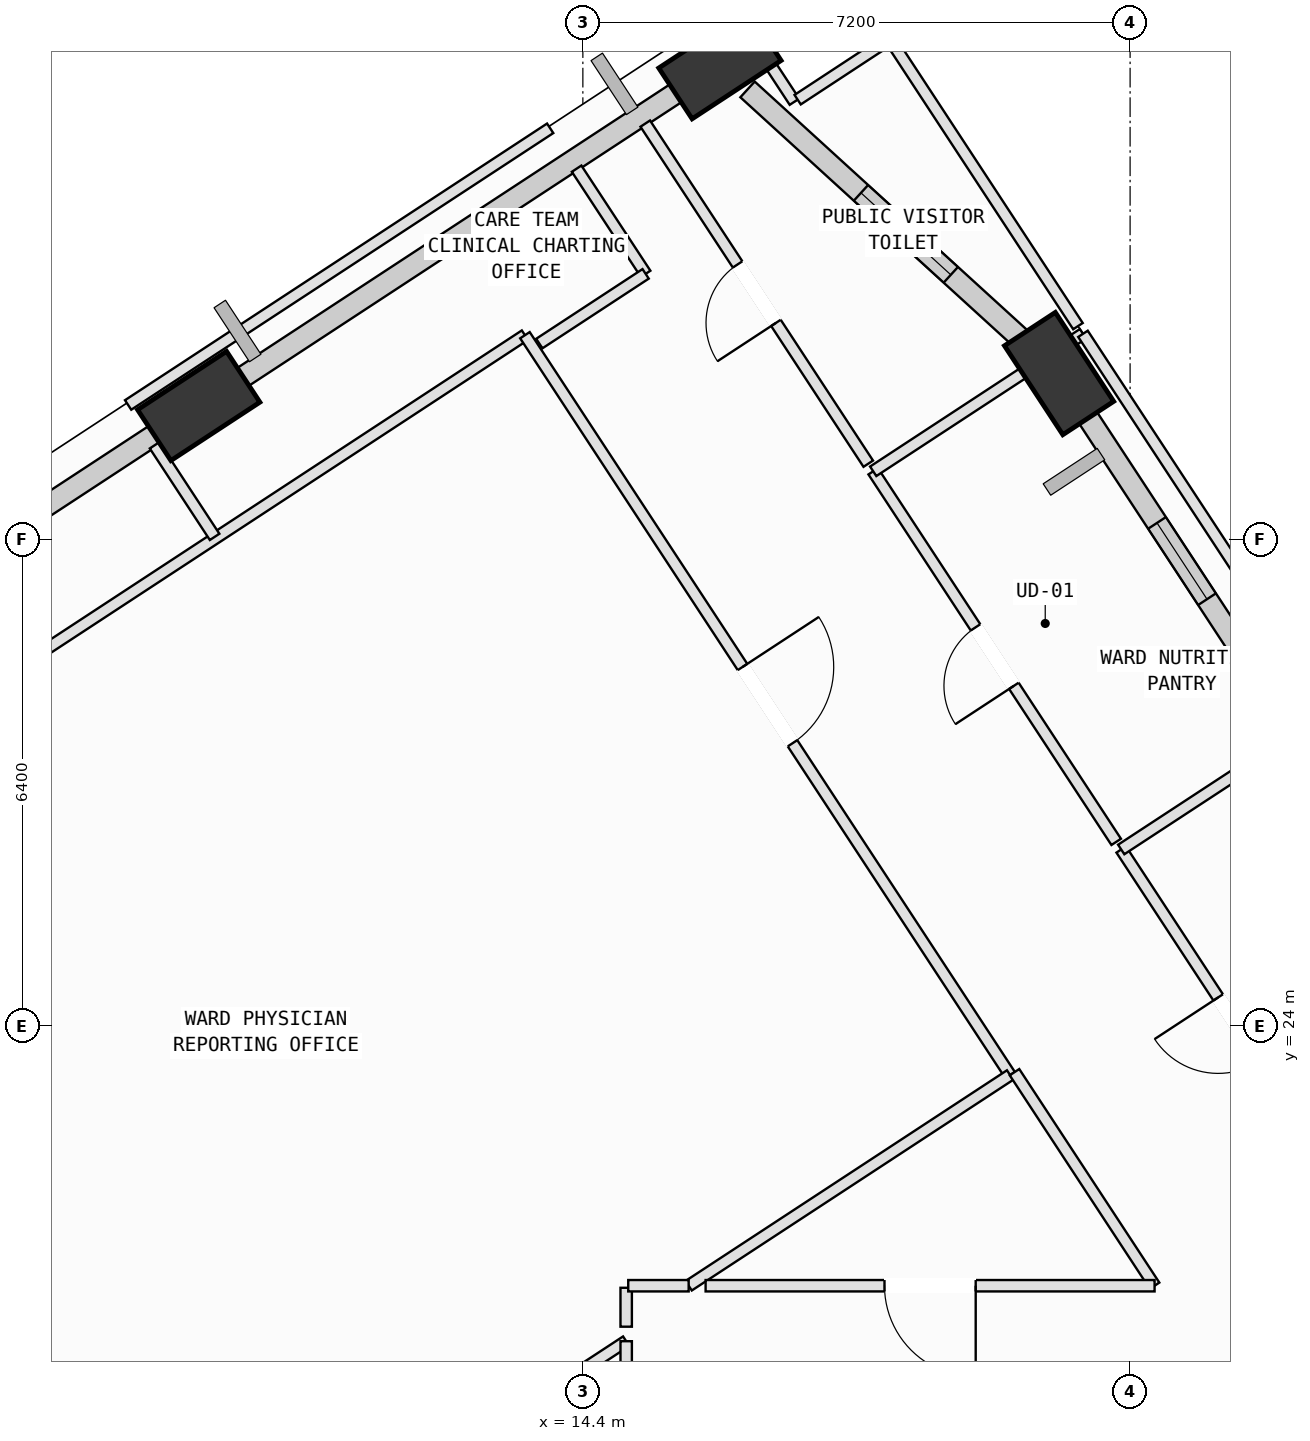
"""IFC4 building model, lengths in metres.
Left out: names, types, materials, properties, quantities, classifications, styles, units other than length and angle.
Written with IfcOpenShell. Run it as: python <this file> out.ifc"""

import sys

from ifc_helpers import new_model, si_unit, direction, frame, frame_2d, origin, origin_2d, place, context, subcontext, project, spatial, rectangle, extrude, element, fill, save


model = new_model("IFC4")
c1 = context("Model", 3, precision=1e-05, world=origin(), true_north=direction((0.0, 1.0)))
c2 = subcontext(c1, "Body", "Model", "MODEL_VIEW")
j1 = project(units=[si_unit("LENGTHUNIT", "METRE"), si_unit("PLANEANGLEUNIT", "RADIAN")], contexts=[c1])
p1 = place(None, origin())
s1 = spatial("IfcSite", under=j1, at=p1, CompositionType="ELEMENT")
p2 = place(p1, origin())
s2 = spatial("IfcBuilding", under=s1, at=p2, CompositionType="ELEMENT")
p3 = place(p2, frame((0.0, 0.0, 165.8)))
s3 = spatial("IfcBuildingStorey", under=s2, at=p3, CompositionType="ELEMENT", Elevation=165.8)
p4 = place(p3, frame((20.666, 32.582, 0.002), z_axis=(-0.031766312901, -0.053777136236, 0.99804755447), x_axis=(-0.047579985119, 0.997500791827, 0.052233277912)))
e1 = element("IfcColumn", 1, at=p4, inside=s3, PredefinedType="COLUMN", context=c2, shape_type="SweptSolid", body=[
    extrude(rectangle(XDim=1.4, YDim=0.8, at=origin_2d()), origin(), (0.0, 0.0, 1.0), 4.004),
])
p5 = place(p3, frame((16.204, 36.652, 0.002), z_axis=(-0.048383489363, -0.072240505501, 0.996213002988), x_axis=(0.998796364309, -0.011541167094, 0.047672047424)))
e2 = element("IfcColumn", 2, at=p5, inside=s3, PredefinedType="COLUMN", context=c2, shape_type="SweptSolid", body=[
    extrude(rectangle(XDim=1.4, YDim=0.8, at=origin_2d()), origin(), (0.0, 0.0, 1.0), 4.011),
])
p6 = place(p3, frame((9.346, 32.156, 0.002), z_axis=(-0.029466986513, -0.100248510816, 0.994525983967), x_axis=(0.956119960722, 0.28731928524, 0.057290915853)))
e3 = element("IfcColumn", 3, at=p6, inside=s3, PredefinedType="COLUMN", context=c2, shape_type="SweptSolid", body=[
    extrude(rectangle(XDim=1.4, YDim=0.8, at=origin_2d()), origin(), (0.0, 0.0, 1.0), 4.018),
])
p7 = place(p3, frame((24.373, 26.928, 0.0), z_axis=(0.0, 0.0, 1.0), x_axis=(-0.548310186412, 0.836275038176, 0.0)))
e4 = element("IfcWall", 4, at=p7, inside=s3, PredefinedType="SOLIDWALL", context=c2, shape_type="SweptSolid", body=[
    extrude(rectangle(XDim=6.223, YDim=0.28, at=frame_2d((3.111, 0.0))), origin(), (0.0, 0.0, 1.0), 3.165),
])
p8 = place(p7, frame((3.211, 0.0, 0.75)))
e5 = element("IfcOpeningElement", 5, at=p8, cuts=e4, PredefinedType="OPENING", context=c2, shape_type="SweptSolid", body=[
    extrude(rectangle(XDim=1.2, YDim=1.75, at=frame_2d((0.6, 0.875))), frame((0.0, 0.15, 0.0), z_axis=(0.0, -1.0, 0.0), x_axis=(1.0, 0.0, 0.0)), (0.0, 0.0, 1.0), 0.3),
])
p9 = place(p3, frame((16.567, 36.321, 0.0), z_axis=(0.0, 0.0, 1.0), x_axis=(0.738817531131, -0.673905524308, 0.0)))
e6 = element("IfcWall", 6, at=p9, inside=s3, PredefinedType="SOLIDWALL", context=c2, shape_type="SweptSolid", body=[
    extrude(rectangle(XDim=5.093, YDim=0.28, at=frame_2d((2.546, 0.0))), origin(), (0.0, 0.0, 1.0), 3.165),
])
p10 = place(p9, frame((2.02, 0.0, 0.75)))
e7 = element("IfcOpeningElement", 7, at=p10, cuts=e6, PredefinedType="OPENING", context=c2, shape_type="SweptSolid", body=[
    extrude(rectangle(XDim=1.6, YDim=1.95, at=frame_2d((0.8, 0.975))), frame((0.0, 0.15, 0.0), z_axis=(0.0, -1.0, 0.0), x_axis=(1.0, 0.0, 0.0)), (0.0, 0.0, 1.0), 0.3),
])
p11 = place(p3, frame((9.611, 32.33, 0.0), z_axis=(0.0, 0.0, 1.0), x_axis=(0.836290304758, 0.548286901327, 0.0)))
e8 = element("IfcWall", 8, at=p11, inside=s3, PredefinedType="SOLIDWALL", context=c2, shape_type="SweptSolid", body=[
    extrude(rectangle(XDim=7.231, YDim=0.28, at=frame_2d((3.615, 0.0))), origin(), (0.0, 0.0, 1.0), 3.165),
])
p12 = place(p3, frame((2.733, 27.821, 0.0), z_axis=(0.0, 0.0, 1.0), x_axis=(0.836277942269, 0.548305757105, 0.0)))
e9 = element("IfcWall", 9, at=p12, inside=s3, PredefinedType="SOLIDWALL", context=c2, shape_type="SweptSolid", body=[
    extrude(rectangle(XDim=7.27, YDim=0.28, at=frame_2d((3.635, 0.0))), origin(), (0.0, 0.0, 1.0), 3.165),
])
p13 = place(p3, frame((7.409, 14.893, 0.0), z_axis=(0.0, 0.0, 1.0), x_axis=(0.836296330396, 0.548277710441, 0.0)))
e10 = element("IfcWall", 10, at=p13, inside=s3, PredefinedType="PARTITIONING", context=c2, shape_type="SweptSolid", body=[
    extrude(rectangle(XDim=9.041, YDim=0.15, at=frame_2d((4.521, 0.0))), origin(), (0.0, 0.0, 1.0), 3.78),
])
p14 = place(p13, frame((4.091, 0.0, 0.0)))
e11 = element("IfcOpeningElement", 11, at=p14, cuts=e10, PredefinedType="OPENING", context=c2, shape_type="SweptSolid", body=[
    extrude(rectangle(XDim=0.86, YDim=2.06, at=frame_2d((0.43, 1.03))), frame((0.0, 0.085, 0.0), z_axis=(0.0, -1.0, 0.0), x_axis=(1.0, 0.0, 0.0)), (0.0, 0.0, 1.0), 0.17),
])
p15 = place(p3, frame((14.97, 19.85, 0.0), z_axis=(0.0, 0.0, 1.0), x_axis=(0.0, -1.0, 0.0)))
e12 = element("IfcWall", 12, at=p15, inside=s3, PredefinedType="PARTITIONING", context=c2, shape_type="SweptSolid", body=[
    extrude(rectangle(XDim=1.62, YDim=0.15, at=frame_2d((0.81, 0.0))), origin(), (0.0, 0.0, 1.0), 3.78),
])
p16 = place(p3, frame((14.97, 20.553, 0.0), z_axis=(0.0, 0.0, 1.0), x_axis=(0.0, -1.0, 0.0)))
e13 = element("IfcWall", 13, at=p16, inside=s3, PredefinedType="PARTITIONING", context=c2, shape_type="SweptSolid", body=[
    extrude(rectangle(XDim=0.512, YDim=0.15, at=frame_2d((0.256, 0.0))), origin(), (0.0, 0.0, 1.0), 3.78),
])
p17 = place(p3, frame((2.54, 25.81, 0.0), z_axis=(0.0, 0.0, 1.0), x_axis=(0.836260132702, 0.548332919359, 0.0)))
e14 = element("IfcWall", 14, at=p17, inside=s3, PredefinedType="PARTITIONING", context=c2, shape_type="SweptSolid", body=[
    extrude(rectangle(XDim=13.271, YDim=0.15, at=frame_2d((6.635, 0.0))), origin(), (0.0, 0.0, 1.0), 3.78),
])
p18 = place(p3, frame((13.638, 33.087, 0.0), z_axis=(0.0, 0.0, 1.0), x_axis=(0.548329312424, -0.836262497746, 0.0)))
e15 = element("IfcWall", 15, at=p18, inside=s3, PredefinedType="PARTITIONING", context=c2, shape_type="SweptSolid", body=[
    extrude(rectangle(XDim=11.641, YDim=0.15, at=frame_2d((5.82, 0.0))), origin(), (0.0, 0.0, 1.0), 3.78),
])
p19 = place(p18, frame((5.22, 0.0, 0.0)))
e16 = element("IfcOpeningElement", 16, at=p19, cuts=e15, PredefinedType="OPENING", context=c2, shape_type="SweptSolid", body=[
    extrude(rectangle(XDim=1.2, YDim=2.15, at=frame_2d((0.6, 1.075))), frame((0.0, 0.085, 0.0), z_axis=(0.0, -1.0, 0.0), x_axis=(1.0, 0.0, 0.0)), (0.0, 0.0, 1.0), 0.17),
])
p20 = place(p3, frame((20.021, 23.352, 0.0), z_axis=(0.0, 0.0, 1.0), x_axis=(-0.836348158254, -0.548198648471, 0.0)))
e17 = element("IfcWall", 17, at=p20, inside=s3, PredefinedType="PARTITIONING", context=c2, shape_type="SweptSolid", body=[
    extrude(rectangle(XDim=5.056, YDim=0.15, at=frame_2d((2.528, 0.0))), origin(), (0.0, 0.0, 1.0), 3.78),
])
p21 = place(p3, frame((15.792, 20.58, 0.0), z_axis=(0.0, 0.0, 1.0), x_axis=(-1.0, 0.0, 0.0)))
e18 = element("IfcWall", 18, at=p21, inside=s3, PredefinedType="PARTITIONING", context=c2, shape_type="SweptSolid", body=[
    extrude(rectangle(XDim=0.795, YDim=0.15, at=frame_2d((0.397, 0.0))), origin(), (0.0, 0.0, 1.0), 3.78),
])
p22 = place(p3, frame((24.583, 21.591, 0.0), z_axis=(0.0, 0.0, 1.0), x_axis=(-0.548247074475, 0.8363164146, 0.0)))
e19 = element("IfcWall", 19, at=p22, inside=s3, PredefinedType="PARTITIONING", context=c2, shape_type="SweptSolid", body=[
    extrude(rectangle(XDim=5.655, YDim=0.15, at=frame_2d((2.827, 0.0))), origin(), (0.0, 0.0, 1.0), 3.415),
])
p23 = place(p22, frame((2.327, 0.0, 0.0)))
e20 = element("IfcOpeningElement", 20, at=p23, cuts=e19, PredefinedType="OPENING", context=c2, shape_type="SweptSolid", body=[
    extrude(rectangle(XDim=1.0, YDim=2.12, at=frame_2d((0.5, 1.06))), frame((0.0, 0.085, 0.0), z_axis=(0.0, -1.0, 0.0), x_axis=(1.0, 0.0, 0.0)), (0.0, 0.0, 1.0), 0.17),
])
p24 = place(p3, frame((21.483, 26.32, 0.0), z_axis=(0.0, 0.0, 1.0), x_axis=(0.836499207519, 0.547968133946, 0.0)))
e21 = element("IfcWall", 21, at=p24, inside=s3, PredefinedType="PARTITIONING", context=c2, shape_type="SweptSolid", body=[
    extrude(rectangle(XDim=2.635, YDim=0.15, at=frame_2d((1.317, 0.0))), origin(), (0.0, 0.0, 1.0), 3.78),
])
p25 = place(p3, frame((21.417, 26.42, 0.0), z_axis=(0.0, 0.0, 1.0), x_axis=(-0.548316159606, 0.836271121775, 0.0)))
e22 = element("IfcWall", 22, at=p25, inside=s3, PredefinedType="PARTITIONING", context=c2, shape_type="SweptSolid", body=[
    extrude(rectangle(XDim=5.831, YDim=0.15, at=frame_2d((2.915, 0.0))), origin(), (0.0, 0.0, 1.0), 3.78),
])
p26 = place(p25, frame((2.455, 0.0, 0.0)))
e23 = element("IfcOpeningElement", 23, at=p26, cuts=e22, PredefinedType="OPENING", context=c2, shape_type="SweptSolid", body=[
    extrude(rectangle(XDim=0.92, YDim=2.1, at=frame_2d((0.46, 1.05))), frame((0.0, 0.085, 0.0), z_axis=(0.0, -1.0, 0.0), x_axis=(1.0, 0.0, 0.0)), (0.0, 0.0, 1.0), 0.17),
])
p27 = place(p3, frame((18.22, 31.296, 0.0), z_axis=(0.0, 0.0, 1.0), x_axis=(0.836350018485, 0.548195810436, 0.0)))
e24 = element("IfcWall", 24, at=p27, inside=s3, PredefinedType="PARTITIONING", context=c2, shape_type="SweptSolid", body=[
    extrude(rectangle(XDim=3.3, YDim=0.15, at=frame_2d((1.65, 0.0))), origin(), (0.0, 0.0, 1.0), 3.78),
])
p28 = place(p3, frame((20.98, 33.105, 0.0), z_axis=(0.0, 0.0, 1.0), x_axis=(0.548392968486, -0.836220755611, 0.0)))
e25 = element("IfcWall", 25, at=p28, inside=s3, PredefinedType="PARTITIONING", context=c2, shape_type="SweptSolid", body=[
    extrude(rectangle(XDim=5.83, YDim=0.15, at=frame_2d((2.915, 0.0))), origin(), (0.0, 0.0, 1.0), 3.78),
])
p29 = place(p3, frame((18.439, 36.982, 0.0), z_axis=(0.0, 0.0, 1.0), x_axis=(0.548219331608, -0.836334600774, 0.0)))
e26 = element("IfcWall", 26, at=p29, inside=s3, PredefinedType="PARTITIONING", context=c2, shape_type="SweptSolid", body=[
    extrude(rectangle(XDim=4.515, YDim=0.15, at=frame_2d((2.257, 0.0))), origin(), (0.0, 0.0, 1.0), 3.78),
])
p30 = place(p3, frame((18.155, 31.396, 0.0), z_axis=(0.0, 0.0, 1.0), x_axis=(-0.548303612182, 0.836279348584, 0.0)))
e27 = element("IfcWall", 27, at=p30, inside=s3, PredefinedType="PARTITIONING", context=c2, shape_type="SweptSolid", body=[
    extrude(rectangle(XDim=5.351, YDim=0.15, at=frame_2d((2.676, 0.0))), origin(), (0.0, 0.0, 1.0), 3.78),
])
p31 = place(p30, frame((2.216, 0.0, 0.0)))
e28 = element("IfcOpeningElement", 28, at=p31, cuts=e27, PredefinedType="OPENING", context=c2, shape_type="SweptSolid", body=[
    extrude(rectangle(XDim=0.92, YDim=2.1, at=frame_2d((0.46, 1.05))), frame((0.0, 0.085, 0.0), z_axis=(0.0, -1.0, 0.0), x_axis=(1.0, 0.0, 0.0)), (0.0, 0.0, 1.0), 0.17),
])
p32 = place(p3, frame((15.554, 36.454, 0.0), z_axis=(0.0, 0.0, 1.0), x_axis=(0.836679505215, 0.547692802175, 0.0)))
e29 = element("IfcWall", 29, at=p32, inside=s3, PredefinedType="PARTITIONING", context=c2, shape_type="SweptSolid", body=[
    extrude(rectangle(XDim=1.201, YDim=0.15, at=frame_2d((0.601, 0.0))), origin(), (0.0, 0.0, 1.0), 3.165),
])
p33 = place(p3, frame((16.586, 37.07, 0.0), z_axis=(0.0, 0.0, 1.0), x_axis=(0.548793431799, -0.835957994887, 0.0)))
e30 = element("IfcWall", 30, at=p33, inside=s3, PredefinedType="PARTITIONING", context=c2, shape_type="SweptSolid", body=[
    extrude(rectangle(XDim=1.09, YDim=0.15, at=frame_2d((0.545, 0.0))), origin(), (0.0, 0.0, 1.0), 3.78),
])
p34 = place(p3, frame((17.226, 36.186, 0.0), z_axis=(0.0, 0.0, 1.0), x_axis=(0.83583800214, 0.548976169045, 0.0)))
e31 = element("IfcWall", 31, at=p34, inside=s3, PredefinedType="PARTITIONING", context=c2, shape_type="SweptSolid", body=[
    extrude(rectangle(XDim=1.401, YDim=0.15, at=frame_2d((0.7, 0.0))), origin(), (0.0, 0.0, 1.0), 3.78),
])
p35 = place(p3, frame((20.079, 23.39, 0.0), z_axis=(0.0, 0.0, 1.0), x_axis=(0.54846440247, -0.836173904892, 0.0)))
e32 = element("IfcWall", 32, at=p35, inside=s3, PredefinedType="PARTITIONING", context=c2, shape_type="SweptSolid", body=[
    extrude(rectangle(XDim=3.36, YDim=0.15, at=frame_2d((1.68, 0.0))), origin(), (0.0, 0.0, 1.0), 3.78),
])
p36 = place(p3, frame((21.922, 20.58, 0.0), z_axis=(0.0, 0.0, 1.0), x_axis=(-1.0, 0.0, 0.0)))
e33 = element("IfcWall", 33, at=p36, inside=s3, PredefinedType="PARTITIONING", context=c2, shape_type="SweptSolid", body=[
    extrude(rectangle(XDim=5.907, YDim=0.15, at=frame_2d((2.954, 0.0))), origin(), (0.0, 0.0, 1.0), 3.78),
])
p37 = place(p36, frame((2.354, 0.0, 0.0)))
e34 = element("IfcOpeningElement", 34, at=p37, cuts=e33, PredefinedType="OPENING", context=c2, shape_type="SweptSolid", body=[
    extrude(rectangle(XDim=1.2, YDim=2.15, at=frame_2d((0.6, 1.075))), frame((0.0, 0.085, 0.0), z_axis=(0.0, -1.0, 0.0), x_axis=(1.0, 0.0, 0.0)), (0.0, 0.0, 1.0), 0.17),
])
p38 = place(p3, frame((9.555, 30.433, 0.0), z_axis=(0.0, 0.0, 1.0), x_axis=(-0.548349191763, 0.836249462716, 0.0)))
e35 = element("IfcWall", 35, at=p38, inside=s3, PredefinedType="PARTITIONING", context=c2, shape_type="SweptSolid", body=[
    extrude(rectangle(XDim=1.441, YDim=0.15, at=frame_2d((0.72, 0.0))), origin(), (0.0, 0.0, 1.0), 3.78),
])
p39 = place(p3, frame((8.417, 32.169, 0.0), z_axis=(0.0, 0.0, 1.0), x_axis=(0.836324517696, 0.548234713513, 0.0)))
e36 = element("IfcWall", 36, at=p39, inside=s3, PredefinedType="PARTITIONING", context=c2, shape_type="SweptSolid", body=[
    extrude(rectangle(XDim=6.64, YDim=0.15, at=frame_2d((3.32, 0.0))), origin(), (0.0, 0.0, 1.0), 3.78),
])
p40 = place(p3, frame((14.318, 35.278, 0.0), z_axis=(0.0, 0.0, 1.0), x_axis=(0.548524345856, -0.836134583667, 0.0)))
e37 = element("IfcWall", 37, at=p40, inside=s3, PredefinedType="PARTITIONING", context=c2, shape_type="SweptSolid", body=[
    extrude(rectangle(XDim=1.655, YDim=0.15, at=frame_2d((0.828, 0.0))), origin(), (0.0, 0.0, 1.0), 3.78),
])
p41 = place(p3, frame((15.226, 33.894, 0.0), z_axis=(0.0, 0.0, 1.0), x_axis=(-0.836380380156, -0.548149486628, 0.0)))
e38 = element("IfcWall", 38, at=p41, inside=s3, PredefinedType="PARTITIONING", context=c2, shape_type="SweptSolid", body=[
    extrude(rectangle(XDim=1.673, YDim=0.15, at=frame_2d((0.836, 0.0))), origin(), (0.0, 0.0, 1.0), 3.78),
])
p42 = place(p8, origin())
e39 = element("IfcWindow", 39, at=p42, inside=s3, PartitioningType="SINGLE_PANEL", PredefinedType="WINDOW", context=c2, shape_type="SweptSolid", body=[
    extrude(rectangle(XDim=1.2, YDim=1.75, at=frame_2d((0.6, 0.875))), frame((0.0, 0.03, 0.0), z_axis=(0.0, -1.0, 0.0), x_axis=(1.0, 0.0, 0.0)), (0.0, 0.0, 1.0), 0.06),
])
fill(e5, e39)
p43 = place(p10, origin())
e40 = element("IfcWindow", 40, at=p43, inside=s3, PartitioningType="SINGLE_PANEL", PredefinedType="WINDOW", context=c2, shape_type="SweptSolid", body=[
    extrude(rectangle(XDim=1.6, YDim=1.95, at=frame_2d((0.8, 0.975))), frame((0.0, 0.03, 0.0), z_axis=(0.0, -1.0, 0.0), x_axis=(1.0, 0.0, 0.0)), (0.0, 0.0, 1.0), 0.06),
])
fill(e7, e40)
p44 = place(p19, origin())
e41 = element("IfcDoor", 41, at=p44, inside=s3, OperationType="SINGLE_SWING_LEFT", PredefinedType="DOOR", context=c2, shape_type="SweptSolid", body=[
    extrude(rectangle(XDim=1.2, YDim=2.15, at=frame_2d((0.6, 1.075))), frame((0.0, 0.025, 0.0), z_axis=(0.0, -1.0, 0.0), x_axis=(1.0, 0.0, 0.0)), (0.0, 0.0, 1.0), 0.05),
])
fill(e16, e41)
p45 = place(p23, origin())
e42 = element("IfcDoor", 42, at=p45, inside=s3, OperationType="SINGLE_SWING_RIGHT", PredefinedType="DOOR", context=c2, shape_type="SweptSolid", body=[
    extrude(rectangle(XDim=1.0, YDim=2.12, at=frame_2d((0.5, 1.06))), frame((0.0, 0.025, 0.0), z_axis=(0.0, -1.0, 0.0), x_axis=(1.0, 0.0, 0.0)), (0.0, 0.0, 1.0), 0.05),
])
fill(e20, e42)
p46 = place(p26, origin())
e43 = element("IfcDoor", 43, at=p46, inside=s3, OperationType="SINGLE_SWING_LEFT", PredefinedType="DOOR", context=c2, shape_type="SweptSolid", body=[
    extrude(rectangle(XDim=0.92, YDim=2.1, at=frame_2d((0.46, 1.05))), frame((0.0, 0.025, 0.0), z_axis=(0.0, -1.0, 0.0), x_axis=(1.0, 0.0, 0.0)), (0.0, 0.0, 1.0), 0.05),
])
fill(e23, e43)
p47 = place(p31, origin())
e44 = element("IfcDoor", 44, at=p47, inside=s3, OperationType="SINGLE_SWING_LEFT", PredefinedType="DOOR", context=c2, shape_type="SweptSolid", body=[
    extrude(rectangle(XDim=0.92, YDim=2.1, at=frame_2d((0.46, 1.05))), frame((0.0, 0.025, 0.0), z_axis=(0.0, -1.0, 0.0), x_axis=(1.0, 0.0, 0.0)), (0.0, 0.0, 1.0), 0.05),
])
fill(e28, e44)
p48 = place(p37, origin())
e45 = element("IfcDoor", 45, at=p48, inside=s3, OperationType="SINGLE_SWING_LEFT", PredefinedType="DOOR", context=c2, shape_type="SweptSolid", body=[
    extrude(rectangle(XDim=1.2, YDim=2.15, at=frame_2d((0.6, 1.075))), frame((0.0, 0.025, 0.0), z_axis=(0.0, -1.0, 0.0), x_axis=(1.0, 0.0, 0.0)), (0.0, 0.0, 1.0), 0.05),
])
fill(e34, e45)
save(model, sys.argv[1])
